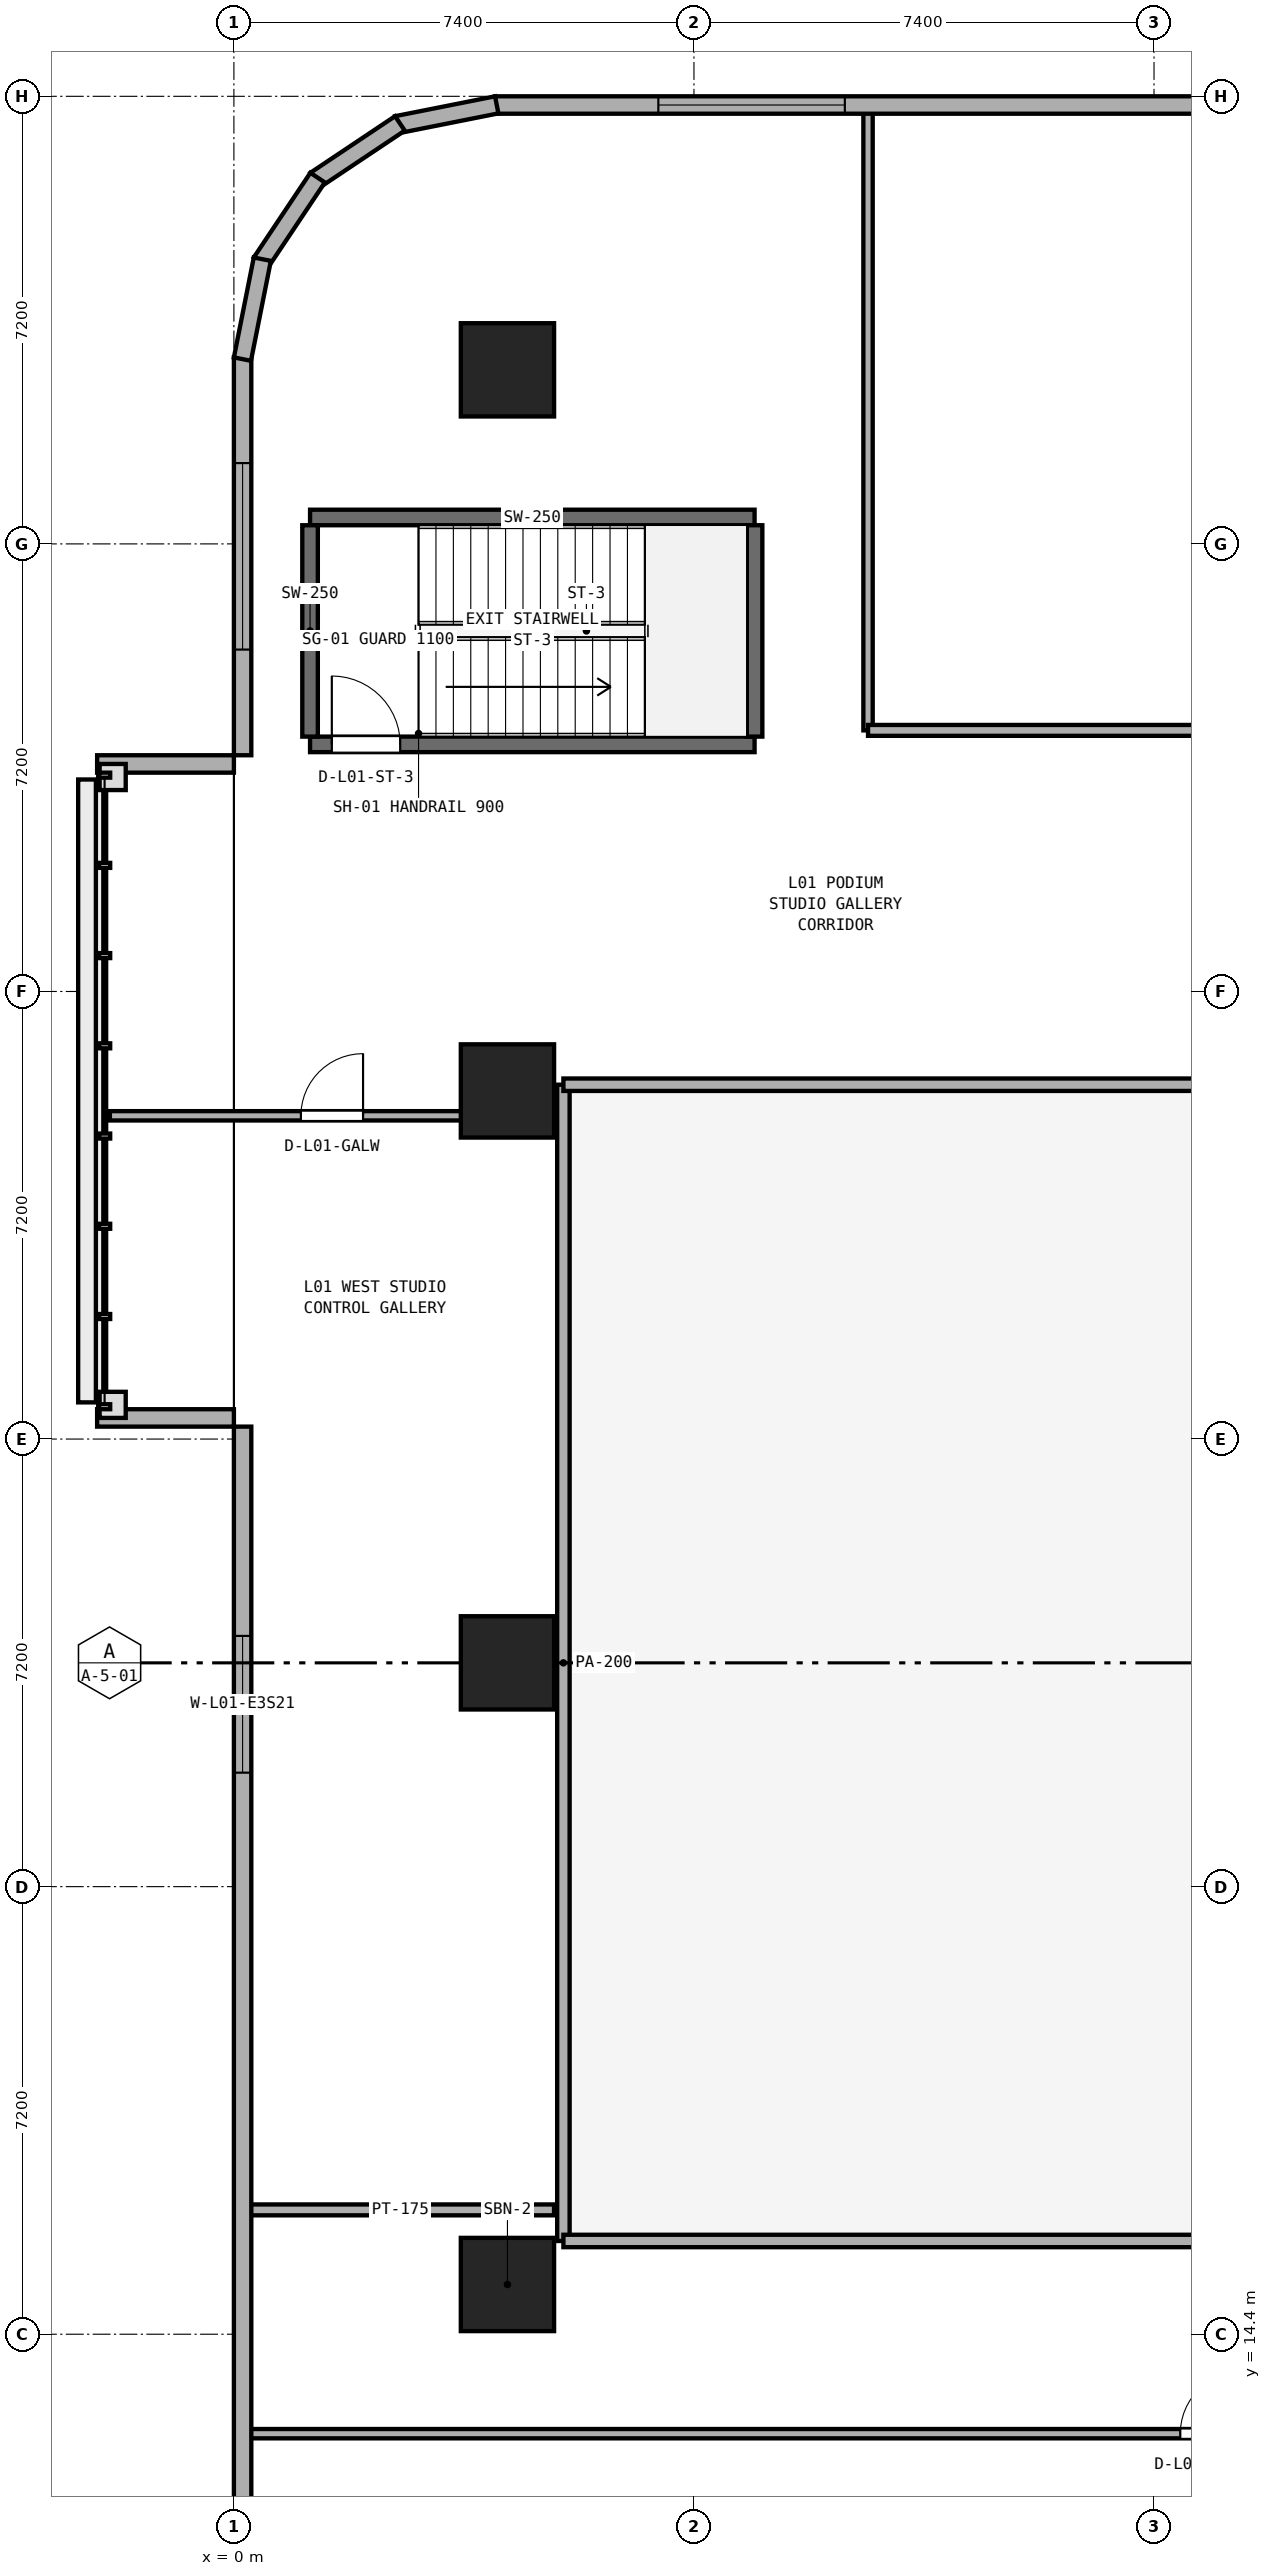
"""IFC4 building model, lengths in metres.
Left out: names, types, materials, properties, quantities, classifications, styles, units other than length and angle.
Written with IfcOpenShell. Run it as: python <this file> out.ifc"""

import sys

from ifc_helpers import new_model, si_unit, direction, frame, frame_2d, origin, origin_2d, place, context, subcontext, project, spatial, rectangle, extrude, element, fill, save


model = new_model("IFC4")
c1 = context("Model", 3, precision=1e-05, world=origin(), true_north=direction((0.0, 1.0)))
c2 = subcontext(c1, "Body", "Model", "MODEL_VIEW")
j1 = project(units=[si_unit("LENGTHUNIT", "METRE"), si_unit("PLANEANGLEUNIT", "RADIAN")], contexts=[c1])
p1 = place(None, origin())
s1 = spatial("IfcSite", under=j1, at=p1, CompositionType="ELEMENT")
p2 = place(p1, origin())
s2 = spatial("IfcBuilding", under=s1, at=p2, CompositionType="ELEMENT")
p3 = place(p2, frame((0.0, 0.0, 5.0)))
s3 = spatial("IfcBuildingStorey", under=s2, at=p3, CompositionType="ELEMENT", Elevation=5.0)
for number, where, z_axis, x_axis in (
    (1, (4.4, 46.0, 0.0), (0.0, 0.0, 1.0), (1.0, 0.0, 0.0)),
    (2, (4.4, 15.2, 0.0), (0.0, 0.0, 1.0), (1.0, 0.0, 0.0)),
    (3, (4.4, 25.2, 0.0), (0.0, 0.0, 1.0), (1.0, 0.0, 0.0)),
    (4, (4.4, 34.4, 0.0), (0.0, 0.0, 1.0), (1.0, 0.0, 0.0)),
):
    element("IfcColumn", number, at=place(p3, frame(where, z_axis=z_axis, x_axis=x_axis)), inside=s3, PredefinedType="COLUMN", context=c2, shape_type="SweptSolid", body=[
        extrude(rectangle(XDim=1.5, YDim=1.5, at=origin_2d()), origin(), (0.0, 0.0, 1.0), 5.0),
    ])
p4 = place(p3, frame((1.225, 39.975, 0.0), z_axis=(0.0, 0.0, 1.0), x_axis=(1.0, 0.0, 0.0)))
e5 = element("IfcWall", 5, at=p4, inside=s3, PredefinedType="SHEAR", context=c2, shape_type="SweptSolid", body=[
    extrude(rectangle(XDim=7.15, YDim=0.25, at=frame_2d((3.575, 0.0))), origin(), (0.0, 0.0, 1.0), 4.66),
])
p5 = place(p4, frame((0.35, 0.0, 0.0)))
e6 = element("IfcOpeningElement", 6, at=p5, cuts=e5, PredefinedType="OPENING", context=c2, shape_type="SweptSolid", body=[
    extrude(rectangle(XDim=1.1, YDim=2.15, at=frame_2d((0.55, 1.075))), frame((0.0, 0.135, 0.0), z_axis=(0.0, -1.0, 0.0), x_axis=(1.0, 0.0, 0.0)), (0.0, 0.0, 1.0), 0.27),
])
p6 = place(p3, frame((1.225, 43.625, 0.0), z_axis=(0.0, 0.0, 1.0), x_axis=(1.0, 0.0, 0.0)))
e7 = element("IfcWall", 7, at=p6, inside=s3, PredefinedType="SHEAR", context=c2, shape_type="SweptSolid", body=[
    extrude(rectangle(XDim=7.15, YDim=0.25, at=frame_2d((3.575, 0.0))), origin(), (0.0, 0.0, 1.0), 4.66),
])
for number, where, z_axis, x_axis in (
    (8, (1.225, 40.1, 0.0), (0.0, 0.0, 1.0), (0.0, 1.0, 0.0)),
    (9, (8.375, 40.1, 0.0), (0.0, 0.0, 1.0), (0.0, 1.0, 0.0)),
):
    element("IfcWall", number, at=place(p3, frame(where, z_axis=z_axis, x_axis=x_axis)), inside=s3, PredefinedType="SHEAR", context=c2, shape_type="SweptSolid", body=[
        extrude(rectangle(XDim=3.4, YDim=0.25, at=frame_2d((1.7, 0.0))), origin(), (0.0, 0.0, 1.0), 4.66),
    ])
p7 = place(p3, frame((5.3, 15.9, 0.0), z_axis=(0.0, 0.0, 1.0), x_axis=(0.0, 1.0, 0.0)))
e10 = element("IfcWall", 10, at=p7, inside=s3, PredefinedType="PARTITIONING", context=c2, shape_type="SweptSolid", body=[
    extrude(rectangle(XDim=18.6, YDim=0.2, at=frame_2d((9.3, 0.0))), origin(), (0.0, 0.0, 1.0), 4.66),
])
p8 = place(p3, frame((5.3, 15.9, 0.0), z_axis=(0.0, 0.0, 1.0), x_axis=(1.0, 0.0, 0.0)))
e11 = element("IfcWall", 11, at=p8, inside=s3, PredefinedType="PARTITIONING", context=c2, shape_type="SweptSolid", body=[
    extrude(rectangle(XDim=18.2, YDim=0.2, at=frame_2d((9.1, 0.0))), origin(), (0.0, 0.0, 1.0), 4.66),
])
p9 = place(p3, frame((5.3, 34.5, 0.0), z_axis=(0.0, 0.0, 1.0), x_axis=(1.0, 0.0, 0.0)))
e12 = element("IfcWall", 12, at=p9, inside=s3, PredefinedType="PARTITIONING", context=c2, shape_type="SweptSolid", body=[
    extrude(rectangle(XDim=18.2, YDim=0.2, at=frame_2d((9.1, 0.0))), origin(), (0.0, 0.0, 1.0), 3.89),
])
p10 = place(p3, frame((10.2, 40.2, 0.0), z_axis=(0.0, 0.0, 1.0), x_axis=(0.0, 1.0, 0.0)))
e13 = element("IfcWall", 13, at=p10, inside=s3, PredefinedType="PARTITIONING", context=c2, shape_type="SweptSolid", body=[
    extrude(rectangle(XDim=9.995, YDim=0.15, at=frame_2d((4.998, 0.0))), origin(), (0.0, 0.0, 1.0), 4.66),
])
p11 = place(p3, frame((0.205, 12.8, 0.0), z_axis=(0.0, 0.0, 1.0), x_axis=(1.0, 0.0, 0.0)))
e14 = element("IfcWall", 14, at=p11, inside=s3, PredefinedType="PARTITIONING", context=c2, shape_type="SweptSolid", body=[
    extrude(rectangle(XDim=75.79, YDim=0.15, at=frame_2d((37.895, 0.0))), origin(), (0.0, 0.0, 1.0), 4.66),
])
p12 = place(p11, frame((15.018, 0.0, 0.0)))
e15 = element("IfcOpeningElement", 15, at=p12, cuts=e14, PredefinedType="OPENING", context=c2, shape_type="SweptSolid", body=[
    extrude(rectangle(XDim=1.0, YDim=2.12, at=frame_2d((0.5, 1.06))), frame((0.0, 0.085, 0.0), z_axis=(0.0, -1.0, 0.0), x_axis=(1.0, 0.0, 0.0)), (0.0, 0.0, 1.0), 0.17),
])
p13 = place(p11, frame((52.673, 0.0, 0.0)))
e16 = element("IfcOpeningElement", 16, at=p13, cuts=e14, PredefinedType="OPENING", context=c2, shape_type="SweptSolid", body=[
    extrude(rectangle(XDim=1.0, YDim=2.12, at=frame_2d((0.5, 1.06))), frame((0.0, 0.085, 0.0), z_axis=(0.0, -1.0, 0.0), x_axis=(1.0, 0.0, 0.0)), (0.0, 0.0, 1.0), 0.17),
])
p14 = place(p3, frame((0.205, 16.4, 0.0), z_axis=(0.0, 0.0, 1.0), x_axis=(1.0, 0.0, 0.0)))
e17 = element("IfcWall", 17, at=p14, inside=s3, PredefinedType="PARTITIONING", context=c2, shape_type="SweptSolid", body=[
    extrude(rectangle(XDim=4.945, YDim=0.175, at=frame_2d((2.472, 0.0))), origin(), (0.0, 0.0, 1.0), 4.66),
])
p15 = place(p3, frame((-1.995, 34.0, 0.0), z_axis=(0.0, 0.0, 1.0), x_axis=(1.0, 0.0, 0.0)))
e18 = element("IfcWall", 18, at=p15, inside=s3, PredefinedType="PARTITIONING", context=c2, shape_type="SweptSolid", body=[
    extrude(rectangle(XDim=7.145, YDim=0.15, at=frame_2d((3.573, 0.0))), origin(), (0.0, 0.0, 1.0), 3.76),
])
p16 = place(p15, frame((3.073, 0.0, 0.0)))
e19 = element("IfcOpeningElement", 19, at=p16, cuts=e18, PredefinedType="OPENING", context=c2, shape_type="SweptSolid", body=[
    extrude(rectangle(XDim=1.0, YDim=2.12, at=frame_2d((0.5, 1.06))), frame((0.0, 0.085, 0.0), z_axis=(0.0, -1.0, 0.0), x_axis=(1.0, 0.0, 0.0)), (0.0, 0.0, 1.0), 0.17),
])
p17 = place(p3, frame((10.2, 40.2, 0.0), z_axis=(0.0, 0.0, 1.0), x_axis=(1.0, 0.0, 0.0)))
e20 = element("IfcWall", 20, at=p17, inside=s3, PredefinedType="PARTITIONING", context=c2, shape_type="SweptSolid", body=[
    extrude(rectangle(XDim=54.0, YDim=0.175, at=frame_2d((27.0, 0.0))), origin(), (0.0, 0.0, 1.0), 4.66),
])
p18 = place(p17, frame((15.52, 0.0, 0.0)))
e21 = element("IfcOpeningElement", 21, at=p18, cuts=e20, PredefinedType="OPENING", context=c2, shape_type="SweptSolid", body=[
    extrude(rectangle(XDim=1.0, YDim=2.12, at=frame_2d((0.5, 1.06))), frame((0.0, 0.097, 0.0), z_axis=(0.0, -1.0, 0.0), x_axis=(1.0, 0.0, 0.0)), (0.0, 0.0, 1.0), 0.195),
])
p19 = place(p17, frame((42.28, 0.0, 0.0)))
e22 = element("IfcOpeningElement", 22, at=p19, cuts=e20, PredefinedType="OPENING", context=c2, shape_type="SweptSolid", body=[
    extrude(rectangle(XDim=1.0, YDim=2.12, at=frame_2d((0.5, 1.06))), frame((0.0, 0.097, 0.0), z_axis=(0.0, -1.0, 0.0), x_axis=(1.0, 0.0, 0.0)), (0.0, 0.0, 1.0), 0.195),
])
p20 = place(p3, frame((29.962, 50.26, 0.0), z_axis=(0.0, 0.0, 1.0), x_axis=(-1.0, 0.0, 0.0)))
e23 = element("IfcWall", 23, at=p20, inside=s3, PredefinedType="STANDARD", context=c2, shape_type="SweptSolid", body=[
    extrude(rectangle(XDim=25.762, YDim=0.28, at=frame_2d((12.881, 0.0))), origin(), (0.0, 0.0, 1.0), 4.66),
])
p21 = place(p20, frame((3.127, 0.0, 0.9)))
e24 = element("IfcOpeningElement", 24, at=p21, cuts=e23, PredefinedType="OPENING", context=c2, shape_type="SweptSolid", body=[
    extrude(rectangle(XDim=3.0, YDim=2.2, at=frame_2d((1.5, 1.1))), frame((0.0, 0.15, 0.0), z_axis=(0.0, -1.0, 0.0), x_axis=(1.0, 0.0, 0.0)), (0.0, 0.0, 1.0), 0.3),
])
p22 = place(p20, frame((11.381, 0.0, 0.9)))
e25 = element("IfcOpeningElement", 25, at=p22, cuts=e23, PredefinedType="OPENING", context=c2, shape_type="SweptSolid", body=[
    extrude(rectangle(XDim=3.0, YDim=2.2, at=frame_2d((1.5, 1.1))), frame((0.0, 0.15, 0.0), z_axis=(0.0, -1.0, 0.0), x_axis=(1.0, 0.0, 0.0)), (0.0, 0.0, 1.0), 0.3),
])
p23 = place(p20, frame((20.135, 0.0, 0.9)))
e26 = element("IfcOpeningElement", 26, at=p23, cuts=e23, PredefinedType="OPENING", context=c2, shape_type="SweptSolid", body=[
    extrude(rectangle(XDim=3.0, YDim=2.2, at=frame_2d((1.5, 1.1))), frame((0.0, 0.15, 0.0), z_axis=(0.0, -1.0, 0.0), x_axis=(1.0, 0.0, 0.0)), (0.0, 0.0, 1.0), 0.3),
])
p24 = place(p3, frame((0.14, 46.2, 0.0), z_axis=(0.0, 0.0, 1.0), x_axis=(0.0, -1.0, 0.0)))
e27 = element("IfcWall", 27, at=p24, inside=s3, PredefinedType="STANDARD", context=c2, shape_type="SweptSolid", body=[
    extrude(rectangle(XDim=6.4, YDim=0.28, at=frame_2d((3.2, 0.0))), origin(), (0.0, 0.0, 1.0), 3.76),
])
p25 = place(p24, frame((1.7, 0.0, 0.9)))
e28 = element("IfcOpeningElement", 28, at=p25, cuts=e27, PredefinedType="OPENING", context=c2, shape_type="SweptSolid", body=[
    extrude(rectangle(XDim=3.0, YDim=2.2, at=frame_2d((1.5, 1.1))), frame((0.0, 0.15, 0.0), z_axis=(0.0, -1.0, 0.0), x_axis=(1.0, 0.0, 0.0)), (0.0, 0.0, 1.0), 0.3),
])
p26 = place(p3, frame((0.14, 29.0, 0.0), z_axis=(0.0, 0.0, 1.0), x_axis=(0.0, -1.0, 0.0)))
e29 = element("IfcWall", 29, at=p26, inside=s3, PredefinedType="STANDARD", context=c2, shape_type="SweptSolid", body=[
    extrude(rectangle(XDim=24.8, YDim=0.28, at=frame_2d((12.4, 0.0))), origin(), (0.0, 0.0, 1.0), 3.76),
])
p27 = place(p26, frame((3.367, 0.0, 0.9)))
e30 = element("IfcOpeningElement", 30, at=p27, cuts=e29, PredefinedType="OPENING", context=c2, shape_type="SweptSolid", body=[
    extrude(rectangle(XDim=2.2, YDim=1.95, at=frame_2d((1.1, 0.975))), frame((0.0, 0.15, 0.0), z_axis=(0.0, -1.0, 0.0), x_axis=(1.0, 0.0, 0.0)), (0.0, 0.0, 1.0), 0.3),
])
p28 = place(p26, frame((19.233, 0.0, 0.9)))
e31 = element("IfcOpeningElement", 31, at=p28, cuts=e29, PredefinedType="OPENING", context=c2, shape_type="SweptSolid", body=[
    extrude(rectangle(XDim=2.2, YDim=1.95, at=frame_2d((1.1, 0.975))), frame((0.0, 0.15, 0.0), z_axis=(0.0, -1.0, 0.0), x_axis=(1.0, 0.0, 0.0)), (0.0, 0.0, 1.0), 0.3),
])
p29 = place(p3, frame((4.227, 50.263, 0.0), z_axis=(0.0, 0.0, 1.0), x_axis=(-0.980797825116, -0.195027244885, 0.0)))
e32 = element("IfcWall", 32, at=p29, inside=s3, PredefinedType="STANDARD", context=c2, shape_type="SweptSolid", body=[
    extrude(rectangle(XDim=1.639, YDim=0.28, at=frame_2d((0.819, 0.0))), origin(), (0.0, 0.0, 1.0), 4.66),
])
p30 = place(p3, frame((2.67, 49.964, 0.0), z_axis=(0.0, 0.0, 1.0), x_axis=(-0.831430845238, -0.555628247651, 0.0)))
e33 = element("IfcWall", 33, at=p30, inside=s3, PredefinedType="STANDARD", context=c2, shape_type="SweptSolid", body=[
    extrude(rectangle(XDim=1.638, YDim=0.28, at=frame_2d((0.819, 0.0))), origin(), (0.0, 0.0, 1.0), 4.66),
])
for number, where, z_axis, x_axis in (
    (34, (1.347, 49.092, 0.0), (0.0, 0.0, 1.0), (-0.556, -0.831, 0.0)),
    (35, (0.457, 47.78, 0.0), (0.0, 0.0, 1.0), (-0.195, -0.981, 0.0)),
):
    element("IfcWall", number, at=place(p3, frame(where, z_axis=z_axis, x_axis=x_axis)), inside=s3, PredefinedType="STANDARD", context=c2, shape_type="SweptSolid", body=[
        extrude(rectangle(XDim=1.639, YDim=0.28, at=frame_2d((0.819, 0.0))), origin(), (0.0, 0.0, 1.0), 4.66),
    ])
for number, where, z_axis, x_axis in (
    (36, (-2.2, 29.14, 0.0), (0.0, 0.0, 1.0), (1.0, 0.0, 0.0)),
    (37, (-2.2, 39.66, 0.0), (0.0, 0.0, 1.0), (1.0, 0.0, 0.0)),
):
    element("IfcWall", number, at=place(p3, frame(where, z_axis=z_axis, x_axis=x_axis)), inside=s3, PredefinedType="STANDARD", context=c2, shape_type="SweptSolid", body=[
        extrude(rectangle(XDim=2.2, YDim=0.28, at=frame_2d((1.1, 0.0))), origin(), (0.0, 0.0, 1.0), 3.967),
    ])
p31 = place(p5, origin())
e38 = element("IfcDoor", 38, at=p31, inside=s3, OperationType="SINGLE_SWING_LEFT", PredefinedType="DOOR", context=c2, shape_type="SweptSolid", body=[
    extrude(rectangle(XDim=1.1, YDim=2.15, at=frame_2d((0.55, 1.075))), frame((0.0, 0.025, 0.0), z_axis=(0.0, -1.0, 0.0), x_axis=(1.0, 0.0, 0.0)), (0.0, 0.0, 1.0), 0.05),
])
fill(e6, e38)
p32 = place(p12, origin())
e39 = element("IfcDoor", 39, at=p32, inside=s3, OperationType="SINGLE_SWING_RIGHT", PredefinedType="DOOR", context=c2, shape_type="SweptSolid", body=[
    extrude(rectangle(XDim=1.0, YDim=2.12, at=frame_2d((0.5, 1.06))), frame((0.0, 0.025, 0.0), z_axis=(0.0, -1.0, 0.0), x_axis=(1.0, 0.0, 0.0)), (0.0, 0.0, 1.0), 0.05),
])
fill(e15, e39)
p33 = place(p16, origin())
e40 = element("IfcDoor", 40, at=p33, inside=s3, OperationType="SINGLE_SWING_RIGHT", PredefinedType="DOOR", context=c2, shape_type="SweptSolid", body=[
    extrude(rectangle(XDim=1.0, YDim=2.12, at=frame_2d((0.5, 1.06))), frame((0.0, 0.025, 0.0), z_axis=(0.0, -1.0, 0.0), x_axis=(1.0, 0.0, 0.0)), (0.0, 0.0, 1.0), 0.05),
])
fill(e19, e40)
p34 = place(p23, origin())
e41 = element("IfcWindow", 41, at=p34, inside=s3, PartitioningType="SINGLE_PANEL", PredefinedType="WINDOW", context=c2, shape_type="SweptSolid", body=[
    extrude(rectangle(XDim=3.0, YDim=2.2, at=frame_2d((1.5, 1.1))), frame((0.0, 0.03, 0.0), z_axis=(0.0, -1.0, 0.0), x_axis=(1.0, 0.0, 0.0)), (0.0, 0.0, 1.0), 0.06),
])
fill(e26, e41)
p35 = place(p25, origin())
e42 = element("IfcWindow", 42, at=p35, inside=s3, PartitioningType="SINGLE_PANEL", PredefinedType="WINDOW", context=c2, shape_type="SweptSolid", body=[
    extrude(rectangle(XDim=3.0, YDim=2.2, at=frame_2d((1.5, 1.1))), frame((0.0, 0.03, 0.0), z_axis=(0.0, -1.0, 0.0), x_axis=(1.0, 0.0, 0.0)), (0.0, 0.0, 1.0), 0.06),
])
fill(e28, e42)
p36 = place(p27, origin())
e43 = element("IfcWindow", 43, at=p36, inside=s3, PartitioningType="SINGLE_PANEL", PredefinedType="WINDOW", context=c2, shape_type="SweptSolid", body=[
    extrude(rectangle(XDim=2.2, YDim=1.95, at=frame_2d((1.1, 0.975))), frame((0.0, 0.03, 0.0), z_axis=(0.0, -1.0, 0.0), x_axis=(1.0, 0.0, 0.0)), (0.0, 0.0, 1.0), 0.06),
])
fill(e30, e43)
save(model, sys.argv[1])
